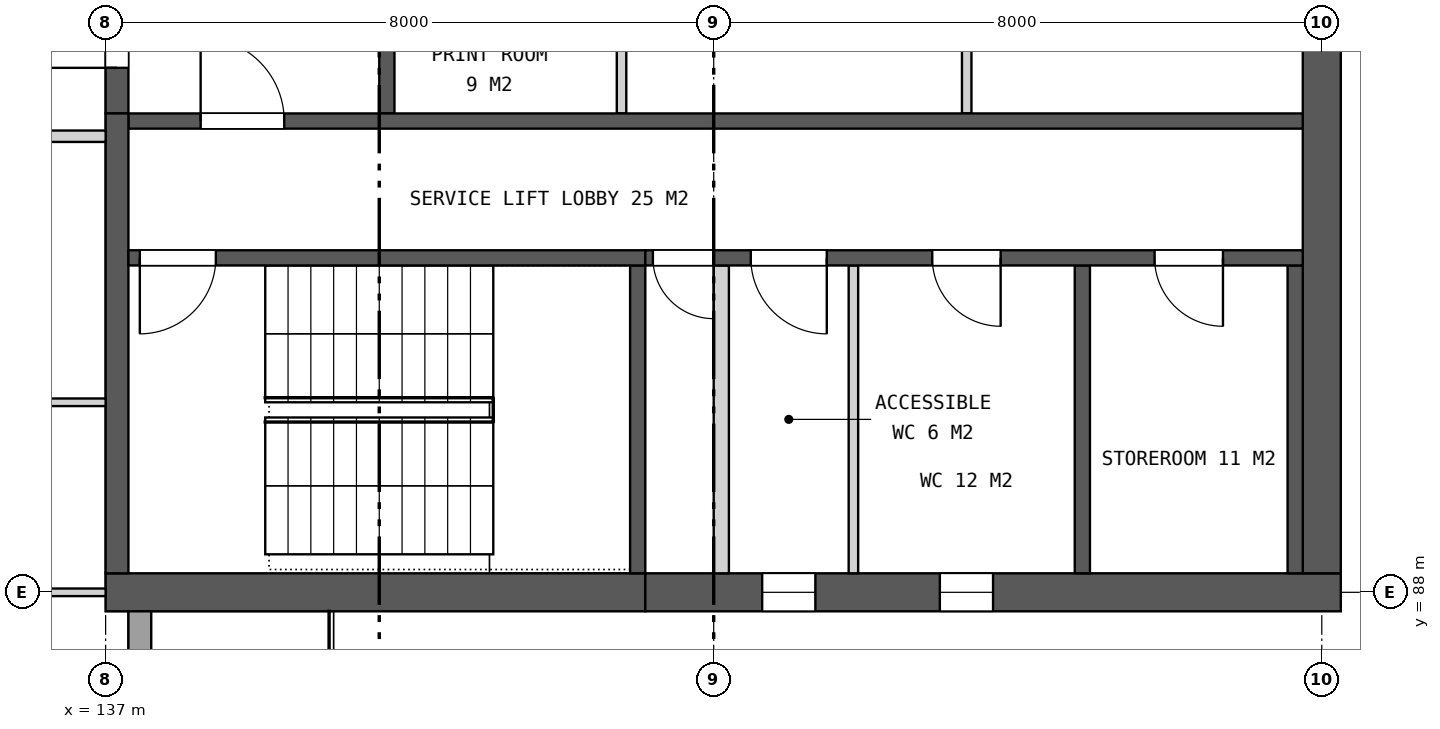
"""IFC4 building model, lengths in metres.
Left out: names, types, materials, properties, quantities, classifications, styles, units other than length and angle.
Written with IfcOpenShell. Run it as: python <this file> out.ifc"""

import sys

from ifc_helpers import new_model, si_unit, direction, frame, frame_2d, origin, place, context, subcontext, project, spatial, rectangle, extrude, element, fill, save


model = new_model("IFC4")
c1 = context("Model", 3, precision=1e-05, world=origin(), true_north=direction((0.0, 1.0)))
c2 = subcontext(c1, "Body", "Model", "MODEL_VIEW")
j1 = project(units=[si_unit("LENGTHUNIT", "METRE"), si_unit("PLANEANGLEUNIT", "RADIAN")], contexts=[c1])
p1 = place(None, origin())
s1 = spatial("IfcSite", under=j1, at=p1, CompositionType="ELEMENT")
p2 = place(p1, origin())
s2 = spatial("IfcBuilding", under=s1, at=p2, CompositionType="ELEMENT")
p3 = place(p2, frame((0.0, 0.0, 311.3)))
s3 = spatial("IfcBuildingStorey", under=s2, at=p3, CompositionType="ELEMENT", Elevation=311.3)
p4 = place(p3, frame((137.0, 88.0, 0.0), z_axis=(0.0, 0.0, 1.0), x_axis=(1.0, 0.0, 0.0)))
e1 = element("IfcWall", 1, at=p4, inside=s3, PredefinedType="SHEAR", context=c2, shape_type="SweptSolid", body=[
    extrude(rectangle(XDim=7.1, YDim=0.5, at=frame_2d((3.55, 0.0))), origin(), (0.0, 0.0, 1.0), 4.2),
])
p5 = place(p3, frame((144.1, 88.0, 0.0), z_axis=(0.0, 0.0, 1.0), x_axis=(1.0, 0.0, 0.0)))
e2 = element("IfcWall", 2, at=p5, inside=s3, PredefinedType="SHEAR", context=c2, shape_type="SweptSolid", body=[
    extrude(rectangle(XDim=9.15, YDim=0.5, at=frame_2d((4.575, 0.0))), origin(), (0.0, 0.0, 1.0), 4.2),
])
p6 = place(p5, frame((1.538, 0.0, 1.5)))
e3 = element("IfcOpeningElement", 3, at=p6, cuts=e2, PredefinedType="OPENING", context=c2, shape_type="SweptSolid", body=[
    extrude(rectangle(XDim=0.7, YDim=0.9, at=frame_2d((0.35, 0.45))), frame((0.0, 0.26, 0.0), z_axis=(0.0, -1.0, 0.0), x_axis=(1.0, 0.0, 0.0)), (0.0, 0.0, 1.0), 0.52),
])
p7 = place(p5, frame((3.875, 0.0, 1.5)))
e4 = element("IfcOpeningElement", 4, at=p7, cuts=e2, PredefinedType="OPENING", context=c2, shape_type="SweptSolid", body=[
    extrude(rectangle(XDim=0.7, YDim=0.9, at=frame_2d((0.35, 0.45))), frame((0.0, 0.26, 0.0), z_axis=(0.0, -1.0, 0.0), x_axis=(1.0, 0.0, 0.0)), (0.0, 0.0, 1.0), 0.52),
])
p8 = place(p3, frame((153.0, 88.25, 0.0), z_axis=(0.0, 0.0, 1.0), x_axis=(0.0, 1.0, 0.0)))
e5 = element("IfcWall", 5, at=p8, inside=s3, PredefinedType="SHEAR", context=c2, shape_type="SweptSolid", body=[
    extrude(rectangle(XDim=23.5, YDim=0.5, at=frame_2d((11.75, 0.0))), origin(), (0.0, 0.0, 1.0), 4.2),
])
p9 = place(p8, frame((9.95, 0.0, 0.15)))
e6 = element("IfcOpeningElement", 6, at=p9, cuts=e5, PredefinedType="OPENING", context=c2, shape_type="SweptSolid", body=[
    extrude(rectangle(XDim=3.6, YDim=3.0, at=frame_2d((1.8, 1.5))), frame((0.0, 0.26, 0.0), z_axis=(0.0, -1.0, 0.0), x_axis=(1.0, 0.0, 0.0)), (0.0, 0.0, 1.0), 0.52),
])
p10 = place(p3, frame((137.15, 94.3, 0.0), z_axis=(0.0, 0.0, 1.0), x_axis=(0.0, 1.0, 0.0)))
e7 = element("IfcWall", 7, at=p10, inside=s3, PredefinedType="SHEAR", context=c2, shape_type="SweptSolid", body=[
    extrude(rectangle(XDim=11.4, YDim=0.3, at=frame_2d((5.7, 0.0))), origin(), (0.0, 0.0, 1.0), 4.2),
])
p11 = place(p10, frame((0.6, 0.0, 0.0)))
e8 = element("IfcOpeningElement", 8, at=p11, cuts=e7, PredefinedType="OPENING", context=c2, shape_type="SweptSolid", body=[
    extrude(rectangle(XDim=2.4, YDim=2.4, at=frame_2d((1.2, 1.2))), frame((0.0, 0.16, 0.0), z_axis=(0.0, -1.0, 0.0), x_axis=(1.0, 0.0, 0.0)), (0.0, 0.0, 1.0), 0.32),
])
p12 = place(p10, frame((4.5, 0.0, 0.0)))
e9 = element("IfcOpeningElement", 9, at=p12, cuts=e7, PredefinedType="OPENING", context=c2, shape_type="SweptSolid", body=[
    extrude(rectangle(XDim=2.4, YDim=2.4, at=frame_2d((1.2, 1.2))), frame((0.0, 0.16, 0.0), z_axis=(0.0, -1.0, 0.0), x_axis=(1.0, 0.0, 0.0)), (0.0, 0.0, 1.0), 0.32),
])
p13 = place(p10, frame((8.4, 0.0, 0.0)))
e10 = element("IfcOpeningElement", 10, at=p13, cuts=e7, PredefinedType="OPENING", context=c2, shape_type="SweptSolid", body=[
    extrude(rectangle(XDim=2.4, YDim=2.4, at=frame_2d((1.2, 1.2))), frame((0.0, 0.16, 0.0), z_axis=(0.0, -1.0, 0.0), x_axis=(1.0, 0.0, 0.0)), (0.0, 0.0, 1.0), 0.32),
])
p14 = place(p3, frame((140.7, 94.3, 0.0), z_axis=(0.0, 0.0, 1.0), x_axis=(0.0, 1.0, 0.0)))
e11 = element("IfcWall", 11, at=p14, inside=s3, PredefinedType="SHEAR", context=c2, shape_type="SweptSolid", body=[
    extrude(rectangle(XDim=3.0, YDim=0.2, at=frame_2d((1.5, 0.0))), origin(), (0.0, 0.0, 1.0), 4.2),
])
for number, where, z_axis, x_axis in (
    (12, (143.788, 94.3, 0.0), (0.0, 0.0, 1.0), (0.0, 1.0, 0.0)),
    (13, (148.329, 94.3, 0.0), (0.0, 0.0, 1.0), (0.0, 1.0, 0.0)),
):
    element("IfcWall", number, at=place(p3, frame(where, z_axis=z_axis, x_axis=x_axis)), inside=s3, PredefinedType="PARTITIONING", context=c2, shape_type="SweptSolid", body=[
        extrude(rectangle(XDim=3.0, YDim=0.125, at=frame_2d((1.5, 0.0))), origin(), (0.0, 0.0, 1.0), 4.2),
    ])
p15 = place(p3, frame((137.3, 94.2, 0.0), z_axis=(0.0, 0.0, 1.0), x_axis=(1.0, 0.0, 0.0)))
e14 = element("IfcWall", 14, at=p15, inside=s3, PredefinedType="SHEAR", context=c2, shape_type="SweptSolid", body=[
    extrude(rectangle(XDim=15.45, YDim=0.2, at=frame_2d((7.725, 0.0))), origin(), (0.0, 0.0, 1.0), 4.2),
])
p16 = place(p15, frame((0.95, 0.0, 0.0)))
e15 = element("IfcOpeningElement", 15, at=p16, cuts=e14, PredefinedType="OPENING", context=c2, shape_type="SweptSolid", body=[
    extrude(rectangle(XDim=1.1, YDim=2.1, at=frame_2d((0.55, 1.05))), frame((0.0, 0.11, 0.0), z_axis=(0.0, -1.0, 0.0), x_axis=(1.0, 0.0, 0.0)), (0.0, 0.0, 1.0), 0.22),
])
p17 = place(p3, frame((137.15, 88.25, 0.0), z_axis=(0.0, 0.0, 1.0), x_axis=(0.0, 1.0, 0.0)))
e16 = element("IfcWall", 16, at=p17, inside=s3, PredefinedType="SHEAR", context=c2, shape_type="SweptSolid", body=[
    extrude(rectangle(XDim=6.05, YDim=0.3, at=frame_2d((3.025, 0.0))), origin(), (0.0, 0.0, 1.0), 4.2),
])
for number, where, z_axis, x_axis in (
    (17, (144.0, 88.25, 0.0), (0.0, 0.0, 1.0), (0.0, 1.0, 0.0)),
    (18, (149.85, 88.25, 0.0), (0.0, 0.0, 1.0), (0.0, 1.0, 0.0)),
    (19, (152.65, 88.25, 0.0), (0.0, 0.0, 1.0), (0.0, 1.0, 0.0)),
):
    element("IfcWall", number, at=place(p3, frame(where, z_axis=z_axis, x_axis=x_axis)), inside=s3, PredefinedType="SHEAR", context=c2, shape_type="SweptSolid", body=[
        extrude(rectangle(XDim=4.05, YDim=0.2, at=frame_2d((2.025, 0.0))), origin(), (0.0, 0.0, 1.0), 4.2),
    ])
p18 = place(p3, frame((145.1, 88.25, 0.0), z_axis=(0.0, 0.0, 1.0), x_axis=(0.0, 1.0, 0.0)))
e20 = element("IfcWall", 20, at=p18, inside=s3, PredefinedType="PARTITIONING", context=c2, shape_type="SweptSolid", body=[
    extrude(rectangle(XDim=4.05, YDim=0.2, at=frame_2d((2.025, 0.0))), origin(), (0.0, 0.0, 1.0), 4.2),
])
p19 = place(p3, frame((146.838, 88.25, 0.0), z_axis=(0.0, 0.0, 1.0), x_axis=(0.0, 1.0, 0.0)))
e21 = element("IfcWall", 21, at=p19, inside=s3, PredefinedType="PARTITIONING", context=c2, shape_type="SweptSolid", body=[
    extrude(rectangle(XDim=4.05, YDim=0.125, at=frame_2d((2.025, 0.0))), origin(), (0.0, 0.0, 1.0), 4.2),
])
p20 = place(p3, frame((137.3, 92.4, 0.0), z_axis=(0.0, 0.0, 1.0), x_axis=(1.0, 0.0, 0.0)))
e22 = element("IfcWall", 22, at=p20, inside=s3, PredefinedType="SHEAR", context=c2, shape_type="SweptSolid", body=[
    extrude(rectangle(XDim=6.8, YDim=0.2, at=frame_2d((3.4, 0.0))), origin(), (0.0, 0.0, 1.0), 4.2),
])
p21 = place(p20, frame((0.15, 0.0, 0.0)))
e23 = element("IfcOpeningElement", 23, at=p21, cuts=e22, PredefinedType="OPENING", context=c2, shape_type="SweptSolid", body=[
    extrude(rectangle(XDim=1.0, YDim=2.1, at=frame_2d((0.5, 1.05))), frame((0.0, 0.11, 0.0), z_axis=(0.0, -1.0, 0.0), x_axis=(1.0, 0.0, 0.0)), (0.0, 0.0, 1.0), 0.22),
])
p22 = place(p3, frame((144.1, 92.4, 0.0), z_axis=(0.0, 0.0, 1.0), x_axis=(1.0, 0.0, 0.0)))
e24 = element("IfcWall", 24, at=p22, inside=s3, PredefinedType="SHEAR", context=c2, shape_type="SweptSolid", body=[
    extrude(rectangle(XDim=8.65, YDim=0.2, at=frame_2d((4.325, 0.0))), origin(), (0.0, 0.0, 1.0), 4.2),
])
p23 = place(p22, frame((0.1, 0.0, 0.0)))
e25 = element("IfcOpeningElement", 25, at=p23, cuts=e24, PredefinedType="OPENING", context=c2, shape_type="SweptSolid", body=[
    extrude(rectangle(XDim=0.8, YDim=2.1, at=frame_2d((0.4, 1.05))), frame((0.0, 0.11, 0.0), z_axis=(0.0, -1.0, 0.0), x_axis=(1.0, 0.0, 0.0)), (0.0, 0.0, 1.0), 0.22),
])
p24 = place(p22, frame((1.388, 0.0, 0.0)))
e26 = element("IfcOpeningElement", 26, at=p24, cuts=e24, PredefinedType="OPENING", context=c2, shape_type="SweptSolid", body=[
    extrude(rectangle(XDim=1.0, YDim=2.1, at=frame_2d((0.5, 1.05))), frame((0.0, 0.11, 0.0), z_axis=(0.0, -1.0, 0.0), x_axis=(1.0, 0.0, 0.0)), (0.0, 0.0, 1.0), 0.22),
])
p25 = place(p22, frame((3.775, 0.0, 0.0)))
e27 = element("IfcOpeningElement", 27, at=p25, cuts=e24, PredefinedType="OPENING", context=c2, shape_type="SweptSolid", body=[
    extrude(rectangle(XDim=0.9, YDim=2.1, at=frame_2d((0.45, 1.05))), frame((0.0, 0.11, 0.0), z_axis=(0.0, -1.0, 0.0), x_axis=(1.0, 0.0, 0.0)), (0.0, 0.0, 1.0), 0.22),
])
p26 = place(p22, frame((6.7, 0.0, 0.0)))
e28 = element("IfcOpeningElement", 28, at=p26, cuts=e24, PredefinedType="OPENING", context=c2, shape_type="SweptSolid", body=[
    extrude(rectangle(XDim=0.9, YDim=2.1, at=frame_2d((0.45, 1.05))), frame((0.0, 0.11, 0.0), z_axis=(0.0, -1.0, 0.0), x_axis=(1.0, 0.0, 0.0)), (0.0, 0.0, 1.0), 0.22),
])
p27 = place(p3, frame((137.45, 80.035, 0.0), z_axis=(0.0, 0.0, 1.0), x_axis=(0.0, 1.0, 0.0)))
e29 = element("IfcWall", 29, at=p27, inside=s3, PredefinedType="SOLIDWALL", context=c2, shape_type="SweptSolid", body=[
    extrude(rectangle(XDim=7.715, YDim=0.3, at=frame_2d((3.857, 0.0))), origin(), (0.0, 0.0, 1.0), 3.544),
])
p28 = place(p27, frame((2.765, 0.0, 0.0)))
e30 = element("IfcOpeningElement", 30, at=p28, cuts=e29, PredefinedType="OPENING", context=c2, shape_type="SweptSolid", body=[
    extrude(rectangle(XDim=2.4, YDim=2.4, at=frame_2d((1.2, 1.2))), frame((0.0, 0.16, 0.0), z_axis=(0.0, -1.0, 0.0), x_axis=(1.0, 0.0, 0.0)), (0.0, 0.0, 1.0), 0.32),
])
for number, where, z_axis, x_axis in (
    (31, (131.475, 88.0, 0.0), (0.0, 0.0, 1.0), (1.0, 0.0, 0.0)),
    (32, (131.475, 90.5, 0.0), (0.0, 0.0, 1.0), (1.0, 0.0, 0.0)),
):
    element("IfcWall", number, at=place(p3, frame(where, z_axis=z_axis, x_axis=x_axis)), inside=s3, PredefinedType="PARTITIONING", context=c2, shape_type="SweptSolid", body=[
        extrude(rectangle(XDim=5.525, YDim=0.1, at=frame_2d((2.762, 0.0))), origin(), (0.0, 0.0, 1.0), 3.443),
    ])
p29 = place(p3, frame((131.475, 94.0, 0.0), z_axis=(0.0, 0.0, 1.0), x_axis=(1.0, 0.0, 0.0)))
e33 = element("IfcWall", 33, at=p29, inside=s3, PredefinedType="PARTITIONING", context=c2, shape_type="SweptSolid", body=[
    extrude(rectangle(XDim=5.525, YDim=0.15, at=frame_2d((2.762, 0.0))), origin(), (0.0, 0.0, 1.0), 3.443),
])
p30 = place(p6, origin())
e34 = element("IfcWindow", 34, at=p30, inside=s3, PartitioningType="SINGLE_PANEL", PredefinedType="WINDOW", context=c2, shape_type="SweptSolid", body=[
    extrude(rectangle(XDim=0.7, YDim=0.9, at=frame_2d((0.35, 0.45))), frame((0.0, 0.03, 0.0), z_axis=(0.0, -1.0, 0.0), x_axis=(1.0, 0.0, 0.0)), (0.0, 0.0, 1.0), 0.06),
])
fill(e3, e34)
p31 = place(p7, origin())
e35 = element("IfcWindow", 35, at=p31, inside=s3, PartitioningType="SINGLE_PANEL", PredefinedType="WINDOW", context=c2, shape_type="SweptSolid", body=[
    extrude(rectangle(XDim=0.7, YDim=0.9, at=frame_2d((0.35, 0.45))), frame((0.0, 0.03, 0.0), z_axis=(0.0, -1.0, 0.0), x_axis=(1.0, 0.0, 0.0)), (0.0, 0.0, 1.0), 0.06),
])
fill(e4, e35)
p32 = place(p11, origin())
e36 = element("IfcDoor", 36, at=p32, inside=s3, OperationType="DOUBLE_DOOR_SINGLE_SWING", PredefinedType="DOOR", context=c2, shape_type="SweptSolid", body=[
    extrude(rectangle(XDim=2.4, YDim=2.4, at=frame_2d((1.2, 1.2))), frame((0.0, 0.025, 0.0), z_axis=(0.0, -1.0, 0.0), x_axis=(1.0, 0.0, 0.0)), (0.0, 0.0, 1.0), 0.05),
])
fill(e8, e36)
p33 = place(p16, origin())
e37 = element("IfcDoor", 37, at=p33, inside=s3, OperationType="SINGLE_SWING_LEFT", PredefinedType="DOOR", context=c2, shape_type="SweptSolid", body=[
    extrude(rectangle(XDim=1.1, YDim=2.1, at=frame_2d((0.55, 1.05))), frame((0.0, 0.025, 0.0), z_axis=(0.0, -1.0, 0.0), x_axis=(1.0, 0.0, 0.0)), (0.0, 0.0, 1.0), 0.05),
])
fill(e15, e37)
p34 = place(p21, frame((1.0, 0.0, 0.0), z_axis=(0.0, 0.0, 1.0), x_axis=(-1.0, 0.0, 0.0)))
e38 = element("IfcDoor", 38, at=p34, inside=s3, OperationType="SINGLE_SWING_RIGHT", PredefinedType="DOOR", context=c2, shape_type="SweptSolid", body=[
    extrude(rectangle(XDim=1.0, YDim=2.1, at=frame_2d((0.5, 1.05))), frame((0.0, 0.025, 0.0), z_axis=(0.0, -1.0, 0.0), x_axis=(1.0, 0.0, 0.0)), (0.0, 0.0, 1.0), 0.05),
])
fill(e23, e38)
p35 = place(p23, frame((0.8, 0.0, 0.0), z_axis=(0.0, 0.0, 1.0), x_axis=(-1.0, 0.0, 0.0)))
e39 = element("IfcDoor", 39, at=p35, inside=s3, OperationType="SINGLE_SWING_LEFT", PredefinedType="DOOR", context=c2, shape_type="SweptSolid", body=[
    extrude(rectangle(XDim=0.8, YDim=2.1, at=frame_2d((0.4, 1.05))), frame((0.0, 0.025, 0.0), z_axis=(0.0, -1.0, 0.0), x_axis=(1.0, 0.0, 0.0)), (0.0, 0.0, 1.0), 0.05),
])
fill(e25, e39)
p36 = place(p24, frame((1.0, 0.0, 0.0), z_axis=(0.0, 0.0, 1.0), x_axis=(-1.0, 0.0, 0.0)))
e40 = element("IfcDoor", 40, at=p36, inside=s3, OperationType="SINGLE_SWING_LEFT", PredefinedType="DOOR", context=c2, shape_type="SweptSolid", body=[
    extrude(rectangle(XDim=1.0, YDim=2.1, at=frame_2d((0.5, 1.05))), frame((0.0, 0.025, 0.0), z_axis=(0.0, -1.0, 0.0), x_axis=(1.0, 0.0, 0.0)), (0.0, 0.0, 1.0), 0.05),
])
fill(e26, e40)
p37 = place(p25, frame((0.9, 0.0, 0.0), z_axis=(0.0, 0.0, 1.0), x_axis=(-1.0, 0.0, 0.0)))
e41 = element("IfcDoor", 41, at=p37, inside=s3, OperationType="SINGLE_SWING_LEFT", PredefinedType="DOOR", context=c2, shape_type="SweptSolid", body=[
    extrude(rectangle(XDim=0.9, YDim=2.1, at=frame_2d((0.45, 1.05))), frame((0.0, 0.025, 0.0), z_axis=(0.0, -1.0, 0.0), x_axis=(1.0, 0.0, 0.0)), (0.0, 0.0, 1.0), 0.05),
])
fill(e27, e41)
p38 = place(p26, frame((0.9, 0.0, 0.0), z_axis=(0.0, 0.0, 1.0), x_axis=(-1.0, 0.0, 0.0)))
e42 = element("IfcDoor", 42, at=p38, inside=s3, OperationType="SINGLE_SWING_LEFT", PredefinedType="DOOR", context=c2, shape_type="SweptSolid", body=[
    extrude(rectangle(XDim=0.9, YDim=2.1, at=frame_2d((0.45, 1.05))), frame((0.0, 0.025, 0.0), z_axis=(0.0, -1.0, 0.0), x_axis=(1.0, 0.0, 0.0)), (0.0, 0.0, 1.0), 0.05),
])
fill(e28, e42)
save(model, sys.argv[1])
